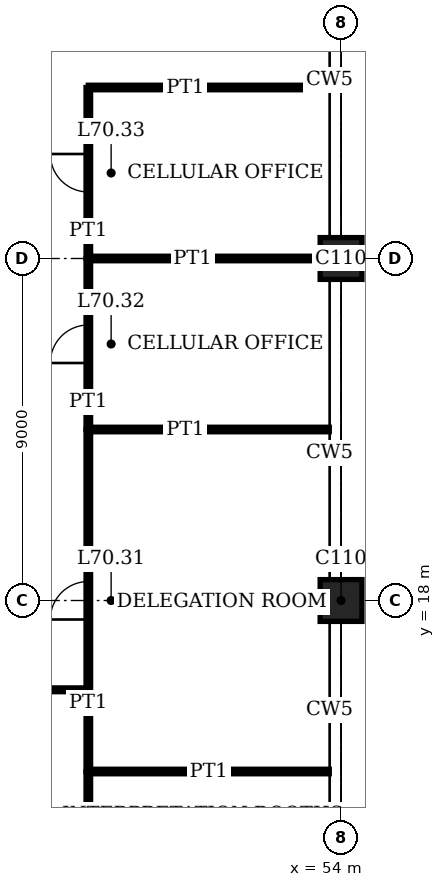
"""IFC4 building model, lengths in metres.
Left out: names, types, materials, properties, quantities, classifications, styles, units other than length and angle.
Written with IfcOpenShell. Run it as: python <this file> out.ifc"""

import sys

from ifc_helpers import new_model, si_unit, direction, frame, frame_2d, origin, origin_2d, place, context, subcontext, project, spatial, rectangle, extrude, element, fill, save


model = new_model("IFC4")
c1 = context("Model", 3, precision=1e-05, world=origin(), true_north=direction((0.0, 1.0)))
c2 = subcontext(c1, "Body", "Model", "MODEL_VIEW")
j1 = project(units=[si_unit("LENGTHUNIT", "METRE"), si_unit("PLANEANGLEUNIT", "RADIAN")], contexts=[c1])
p1 = place(None, origin())
s1 = spatial("IfcSite", under=j1, at=p1, CompositionType="ELEMENT")
p2 = place(p1, origin())
s2 = spatial("IfcBuilding", under=s1, at=p2, CompositionType="ELEMENT")
p3 = place(p2, frame((0.0, 0.0, 287.4)))
s3 = spatial("IfcBuildingStorey", under=s2, at=p3, CompositionType="ELEMENT", Elevation=287.4)
for number, where, z_axis, x_axis in (
    (1, (54.0, 18.0, 0.0), (0.0, 0.0, 1.0), (1.0, 0.0, 0.0)),
    (2, (54.0, 27.0, 0.0), (0.0, 0.0, 1.0), (1.0, 0.0, 0.0)),
):
    element("IfcColumn", number, at=place(p3, frame(where, z_axis=z_axis, x_axis=x_axis)), inside=s3, PredefinedType="COLUMN", context=c2, shape_type="SweptSolid", body=[
        extrude(rectangle(XDim=1.1, YDim=1.1, at=origin_2d()), origin(), (0.0, 0.0, 1.0), 4.0),
    ])
p4 = place(p3, frame((47.35, 13.5, 0.0), z_axis=(0.0, 0.0, 1.0), x_axis=(1.0, 0.0, 0.0)))
e3 = element("IfcWall", 3, at=p4, inside=s3, PredefinedType="PARTITIONING", context=c2, shape_type="SweptSolid", body=[
    extrude(rectangle(XDim=6.34, YDim=0.12, at=frame_2d((3.17, 0.0))), origin(), (0.0, 0.0, 1.0), 3.1),
])
p5 = place(p3, frame((36.01, 15.65, 0.0), z_axis=(0.0, 0.0, 1.0), x_axis=(1.0, 0.0, 0.0)))
e4 = element("IfcWall", 4, at=p5, inside=s3, PredefinedType="PARTITIONING", context=c2, shape_type="SweptSolid", body=[
    extrude(rectangle(XDim=11.33, YDim=0.1, at=frame_2d((5.665, 0.0))), origin(), (0.0, 0.0, 1.0), 3.75),
])
p6 = place(p5, frame((5.165, 0.0, 0.0)))
e5 = element("IfcOpeningElement", 5, at=p6, cuts=e4, PredefinedType="OPENING", context=c2, shape_type="SweptSolid", body=[
    extrude(rectangle(XDim=1.0, YDim=2.4, at=frame_2d((0.5, 1.2))), frame((0.0, 0.06, 0.0), z_axis=(0.0, -1.0, 0.0), x_axis=(1.0, 0.0, 0.0)), (0.0, 0.0, 1.0), 0.12),
])
p7 = place(p3, frame((47.35, 22.5, 0.0), z_axis=(0.0, 0.0, 1.0), x_axis=(1.0, 0.0, 0.0)))
e6 = element("IfcWall", 6, at=p7, inside=s3, PredefinedType="PARTITIONING", context=c2, shape_type="SweptSolid", body=[
    extrude(rectangle(XDim=6.34, YDim=0.12, at=frame_2d((3.17, 0.0))), origin(), (0.0, 0.0, 1.0), 3.1),
])
p8 = place(p3, frame((47.35, 27.0, 0.0), z_axis=(0.0, 0.0, 1.0), x_axis=(1.0, 0.0, 0.0)))
e7 = element("IfcWall", 7, at=p8, inside=s3, PredefinedType="PARTITIONING", context=c2, shape_type="SweptSolid", body=[
    extrude(rectangle(XDim=6.1, YDim=0.12, at=frame_2d((3.05, 0.0))), origin(), (0.0, 0.0, 1.0), 3.05),
])
p9 = place(p3, frame((47.35, 31.5, 0.0), z_axis=(0.0, 0.0, 1.0), x_axis=(1.0, 0.0, 0.0)))
e8 = element("IfcWall", 8, at=p9, inside=s3, PredefinedType="PARTITIONING", context=c2, shape_type="SweptSolid", body=[
    extrude(rectangle(XDim=6.34, YDim=0.12, at=frame_2d((3.17, 0.0))), origin(), (0.0, 0.0, 1.0), 3.1),
])
p10 = place(p3, frame((47.35, 9.0, 0.0), z_axis=(0.0, 0.0, 1.0), x_axis=(0.0, 1.0, 0.0)))
e9 = element("IfcWall", 9, at=p10, inside=s3, PredefinedType="PARTITIONING", context=c2, shape_type="SweptSolid", body=[
    extrude(rectangle(XDim=4.5, YDim=0.12, at=frame_2d((2.25, 0.0))), origin(), (0.0, 0.0, 1.0), 3.75),
])
p11 = place(p10, frame((1.75, 0.0, 0.0)))
e10 = element("IfcOpeningElement", 10, at=p11, cuts=e9, PredefinedType="OPENING", context=c2, shape_type="SweptSolid", body=[
    extrude(rectangle(XDim=1.0, YDim=2.4, at=frame_2d((0.5, 1.2))), frame((0.0, 0.07, 0.0), z_axis=(0.0, -1.0, 0.0), x_axis=(1.0, 0.0, 0.0)), (0.0, 0.0, 1.0), 0.14),
])
p12 = place(p3, frame((47.35, 13.5, 0.0), z_axis=(0.0, 0.0, 1.0), x_axis=(0.0, 1.0, 0.0)))
e11 = element("IfcWall", 11, at=p12, inside=s3, PredefinedType="PARTITIONING", context=c2, shape_type="SweptSolid", body=[
    extrude(rectangle(XDim=9.0, YDim=0.12, at=frame_2d((4.5, 0.0))), origin(), (0.0, 0.0, 1.0), 3.75),
])
p13 = place(p12, frame((4.0, 0.0, 0.0)))
e12 = element("IfcOpeningElement", 12, at=p13, cuts=e11, PredefinedType="OPENING", context=c2, shape_type="SweptSolid", body=[
    extrude(rectangle(XDim=1.0, YDim=2.4, at=frame_2d((0.5, 1.2))), frame((0.0, 0.07, 0.0), z_axis=(0.0, -1.0, 0.0), x_axis=(1.0, 0.0, 0.0)), (0.0, 0.0, 1.0), 0.14),
])
p14 = place(p3, frame((47.35, 22.5, 0.0), z_axis=(0.0, 0.0, 1.0), x_axis=(0.0, 1.0, 0.0)))
e13 = element("IfcWall", 13, at=p14, inside=s3, PredefinedType="PARTITIONING", context=c2, shape_type="SweptSolid", body=[
    extrude(rectangle(XDim=4.5, YDim=0.12, at=frame_2d((2.25, 0.0))), origin(), (0.0, 0.0, 1.0), 3.75),
])
p15 = place(p14, frame((1.75, 0.0, 0.0)))
e14 = element("IfcOpeningElement", 14, at=p15, cuts=e13, PredefinedType="OPENING", context=c2, shape_type="SweptSolid", body=[
    extrude(rectangle(XDim=1.0, YDim=2.4, at=frame_2d((0.5, 1.2))), frame((0.0, 0.07, 0.0), z_axis=(0.0, -1.0, 0.0), x_axis=(1.0, 0.0, 0.0)), (0.0, 0.0, 1.0), 0.14),
])
p16 = place(p3, frame((47.35, 27.0, 0.0), z_axis=(0.0, 0.0, 1.0), x_axis=(0.0, 1.0, 0.0)))
e15 = element("IfcWall", 15, at=p16, inside=s3, PredefinedType="PARTITIONING", context=c2, shape_type="SweptSolid", body=[
    extrude(rectangle(XDim=4.5, YDim=0.12, at=frame_2d((2.25, 0.0))), origin(), (0.0, 0.0, 1.0), 3.75),
])
p17 = place(p16, frame((1.75, 0.0, 0.0)))
e16 = element("IfcOpeningElement", 16, at=p17, cuts=e15, PredefinedType="OPENING", context=c2, shape_type="SweptSolid", body=[
    extrude(rectangle(XDim=1.0, YDim=2.4, at=frame_2d((0.5, 1.2))), frame((0.0, 0.07, 0.0), z_axis=(0.0, -1.0, 0.0), x_axis=(1.0, 0.0, 0.0)), (0.0, 0.0, 1.0), 0.14),
])
p18 = place(p13, origin())
e17 = element("IfcDoor", 17, at=p18, inside=s3, OperationType="SINGLE_SWING_RIGHT", PredefinedType="DOOR", context=c2, shape_type="SweptSolid", body=[
    extrude(rectangle(XDim=1.0, YDim=2.4, at=frame_2d((0.5, 1.2))), frame((0.0, 0.025, 0.0), z_axis=(0.0, -1.0, 0.0), x_axis=(1.0, 0.0, 0.0)), (0.0, 0.0, 1.0), 0.05),
])
fill(e12, e17)
p19 = place(p15, origin())
e18 = element("IfcDoor", 18, at=p19, inside=s3, OperationType="SINGLE_SWING_RIGHT", PredefinedType="DOOR", context=c2, shape_type="SweptSolid", body=[
    extrude(rectangle(XDim=1.0, YDim=2.4, at=frame_2d((0.5, 1.2))), frame((0.0, 0.025, 0.0), z_axis=(0.0, -1.0, 0.0), x_axis=(1.0, 0.0, 0.0)), (0.0, 0.0, 1.0), 0.05),
])
fill(e14, e18)
p20 = place(p17, origin())
e19 = element("IfcDoor", 19, at=p20, inside=s3, OperationType="SINGLE_SWING_LEFT", PredefinedType="DOOR", context=c2, shape_type="SweptSolid", body=[
    extrude(rectangle(XDim=1.0, YDim=2.4, at=frame_2d((0.5, 1.2))), frame((0.0, 0.025, 0.0), z_axis=(0.0, -1.0, 0.0), x_axis=(1.0, 0.0, 0.0)), (0.0, 0.0, 1.0), 0.05),
])
fill(e16, e19)
save(model, sys.argv[1])
